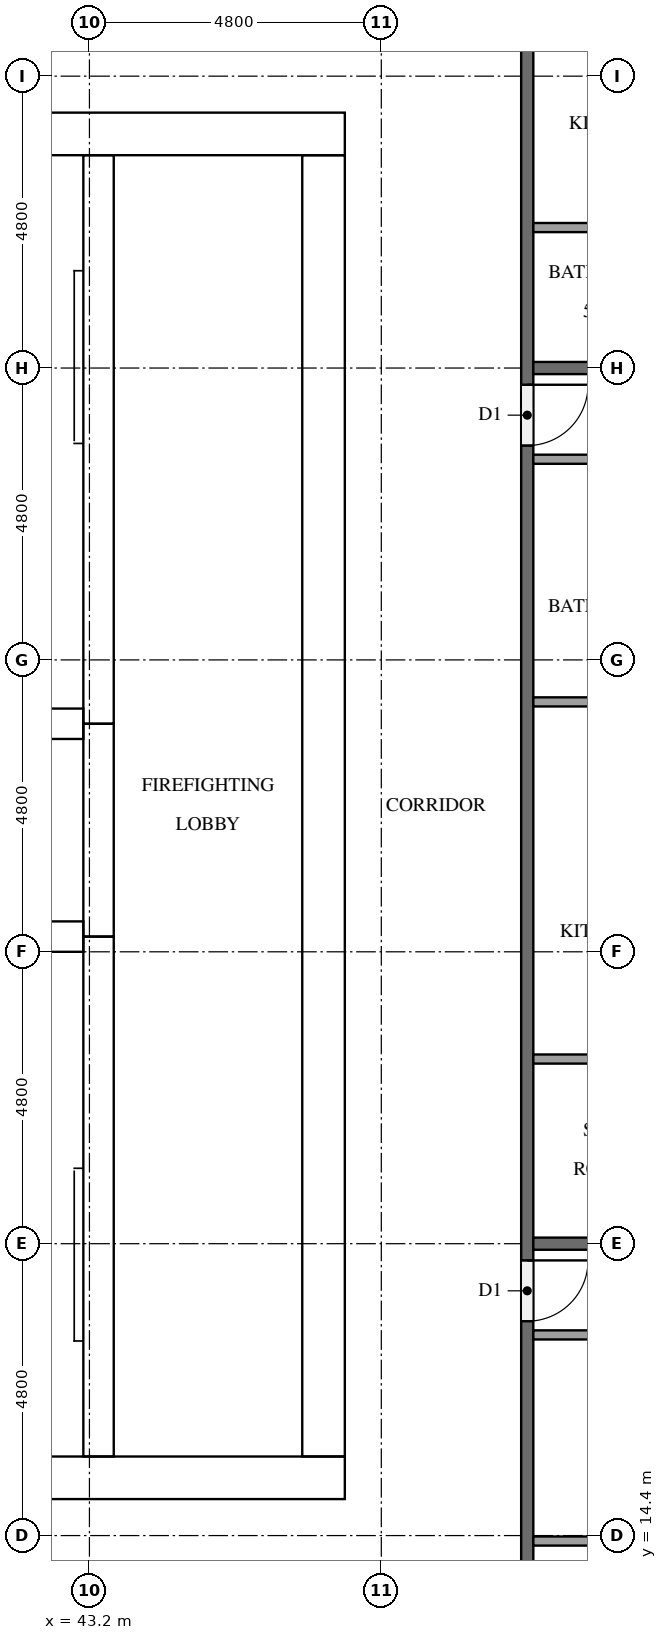
"""IFC4 building model, lengths in metres.
Left out: names, types, materials, properties, quantities, classifications, styles, units other than length and angle.
Written with IfcOpenShell. Run it as: python <this file> out.ifc"""

import sys

from ifc_helpers import new_model, si_unit, direction, frame, frame_2d, origin, place, context, subcontext, project, spatial, rectangle, extrude, element, fill, save


model = new_model("IFC4")
c1 = context("Model", 3, precision=1e-05, world=origin(), true_north=direction((0.0, 1.0)))
c2 = subcontext(c1, "Body", "Model", "MODEL_VIEW")
j1 = project(units=[si_unit("LENGTHUNIT", "METRE"), si_unit("PLANEANGLEUNIT", "RADIAN")], contexts=[c1])
p1 = place(None, origin())
s1 = spatial("IfcSite", under=j1, at=p1, CompositionType="ELEMENT")
p2 = place(p1, origin())
s2 = spatial("IfcBuilding", under=s1, at=p2, CompositionType="ELEMENT")
p3 = place(p2, frame((0.0, 0.0, 222.8)))
s3 = spatial("IfcBuildingStorey", under=s2, at=p3, CompositionType="ELEMENT", Elevation=222.8)
p4 = place(p3, frame((15.0, 15.35, 0.0), z_axis=(0.0, 0.0, 1.0), x_axis=(1.0, 0.0, 0.0)))
e1 = element("IfcWall", 1, at=p4, inside=s3, PredefinedType="SHEAR", context=c2, shape_type="SweptSolid", body=[
    extrude(rectangle(XDim=32.4, YDim=0.7, at=frame_2d((16.2, 0.0))), origin(), (0.0, 0.0, 1.0), 3.2),
])
p5 = place(p4, frame((15.3, 0.0, 0.0)))
e2 = element("IfcOpeningElement", 2, at=p5, cuts=e1, PredefinedType="OPENING", context=c2, shape_type="SweptSolid", body=[
    extrude(rectangle(XDim=1.8, YDim=2.1, at=frame_2d((0.9, 1.05))), frame((0.0, 0.36, 0.0), z_axis=(0.0, -1.0, 0.0), x_axis=(1.0, 0.0, 0.0)), (0.0, 0.0, 1.0), 0.72),
])
p6 = place(p3, frame((15.0, 37.45, 0.0), z_axis=(0.0, 0.0, 1.0), x_axis=(1.0, 0.0, 0.0)))
e3 = element("IfcWall", 3, at=p6, inside=s3, PredefinedType="SHEAR", context=c2, shape_type="SweptSolid", body=[
    extrude(rectangle(XDim=32.4, YDim=0.7, at=frame_2d((16.2, 0.0))), origin(), (0.0, 0.0, 1.0), 3.2),
])
p7 = place(p6, frame((15.3, 0.0, 0.0)))
e4 = element("IfcOpeningElement", 4, at=p7, cuts=e3, PredefinedType="OPENING", context=c2, shape_type="SweptSolid", body=[
    extrude(rectangle(XDim=1.8, YDim=2.1, at=frame_2d((0.9, 1.05))), frame((0.0, 0.36, 0.0), z_axis=(0.0, -1.0, 0.0), x_axis=(1.0, 0.0, 0.0)), (0.0, 0.0, 1.0), 0.72),
])
p8 = place(p6, frame((1.544, 0.0, 0.0)))
e5 = element("IfcOpeningElement", 5, at=p8, cuts=e3, PredefinedType="OPENING", context=c2, shape_type="SweptSolid", body=[
    extrude(rectangle(XDim=1.0, YDim=2.1, at=frame_2d((0.5, 1.05))), frame((0.0, 0.36, 0.0), z_axis=(0.0, -1.0, 0.0), x_axis=(1.0, 0.0, 0.0)), (0.0, 0.0, 1.0), 0.72),
])
p9 = place(p6, frame((5.219, 0.0, 0.0)))
e6 = element("IfcOpeningElement", 6, at=p9, cuts=e3, PredefinedType="OPENING", context=c2, shape_type="SweptSolid", body=[
    extrude(rectangle(XDim=1.0, YDim=2.1, at=frame_2d((0.5, 1.05))), frame((0.0, 0.36, 0.0), z_axis=(0.0, -1.0, 0.0), x_axis=(1.0, 0.0, 0.0)), (0.0, 0.0, 1.0), 0.72),
])
p10 = place(p3, frame((47.05, 15.7, 0.0), z_axis=(0.0, 0.0, 1.0), x_axis=(0.0, 1.0, 0.0)))
e7 = element("IfcWall", 7, at=p10, inside=s3, PredefinedType="SHEAR", context=c2, shape_type="SweptSolid", body=[
    extrude(rectangle(XDim=21.4, YDim=0.7, at=frame_2d((10.7, 0.0))), origin(), (0.0, 0.0, 1.0), 3.2),
])
p11 = place(p10, frame((10.4, 0.0, 0.0)))
e8 = element("IfcOpeningElement", 8, at=p11, cuts=e7, PredefinedType="OPENING", context=c2, shape_type="SweptSolid", body=[
    extrude(rectangle(XDim=1.2, YDim=2.1, at=frame_2d((0.6, 1.05))), frame((0.0, 0.36, 0.0), z_axis=(0.0, -1.0, 0.0), x_axis=(1.0, 0.0, 0.0)), (0.0, 0.0, 1.0), 0.72),
])
p12 = place(p3, frame((43.35, 15.7, 0.0), z_axis=(0.0, 0.0, 1.0), x_axis=(0.0, 1.0, 0.0)))
e9 = element("IfcWall", 9, at=p12, inside=s3, PredefinedType="SHEAR", context=c2, shape_type="SweptSolid", body=[
    extrude(rectangle(XDim=8.55, YDim=0.5, at=frame_2d((4.275, 0.0))), origin(), (0.0, 0.0, 1.0), 3.2),
])
p13 = place(p12, frame((0.5, 0.0, 0.0)))
e10 = element("IfcOpeningElement", 10, at=p13, cuts=e9, PredefinedType="OPENING", context=c2, shape_type="SweptSolid", body=[
    extrude(rectangle(XDim=1.2, YDim=2.1, at=frame_2d((0.6, 1.05))), frame((0.0, 0.26, 0.0), z_axis=(0.0, -1.0, 0.0), x_axis=(1.0, 0.0, 0.0)), (0.0, 0.0, 1.0), 0.52),
])
p14 = place(p3, frame((43.35, 24.25, 0.0), z_axis=(0.0, 0.0, 1.0), x_axis=(0.0, 1.0, 0.0)))
e11 = element("IfcWall", 11, at=p14, inside=s3, PredefinedType="SHEAR", context=c2, shape_type="SweptSolid", body=[
    extrude(rectangle(XDim=3.5, YDim=0.5, at=frame_2d((1.75, 0.0))), origin(), (0.0, 0.0, 1.0), 3.2),
])
p15 = place(p14, frame((1.2, 0.0, 0.0)))
e12 = element("IfcOpeningElement", 12, at=p15, cuts=e11, PredefinedType="OPENING", context=c2, shape_type="SweptSolid", body=[
    extrude(rectangle(XDim=1.1, YDim=2.1, at=frame_2d((0.55, 1.05))), frame((0.0, 0.26, 0.0), z_axis=(0.0, -1.0, 0.0), x_axis=(1.0, 0.0, 0.0)), (0.0, 0.0, 1.0), 0.52),
])
p16 = place(p3, frame((43.35, 27.75, 0.0), z_axis=(0.0, 0.0, 1.0), x_axis=(0.0, 1.0, 0.0)))
e13 = element("IfcWall", 13, at=p16, inside=s3, PredefinedType="SHEAR", context=c2, shape_type="SweptSolid", body=[
    extrude(rectangle(XDim=9.35, YDim=0.5, at=frame_2d((4.675, 0.0))), origin(), (0.0, 0.0, 1.0), 3.2),
])
p17 = place(p16, frame((7.65, 0.0, 0.0)))
e14 = element("IfcOpeningElement", 14, at=p17, cuts=e13, PredefinedType="OPENING", context=c2, shape_type="SweptSolid", body=[
    extrude(rectangle(XDim=1.2, YDim=2.1, at=frame_2d((0.6, 1.05))), frame((0.0, 0.26, 0.0), z_axis=(0.0, -1.0, 0.0), x_axis=(1.0, 0.0, 0.0)), (0.0, 0.0, 1.0), 0.52),
])
for number, where, z_axis, x_axis in (
    (15, (39.55, 24.25, 0.0), (0.0, 0.0, 1.0), (1.0, 0.0, 0.0)),
    (16, (39.55, 27.75, 0.0), (0.0, 0.0, 1.0), (1.0, 0.0, 0.0)),
):
    element("IfcWall", number, at=place(p3, frame(where, z_axis=z_axis, x_axis=x_axis)), inside=s3, PredefinedType="SHEAR", context=c2, shape_type="SweptSolid", body=[
        extrude(rectangle(XDim=3.55, YDim=0.5, at=frame_2d((1.775, 0.0))), origin(), (0.0, 0.0, 1.0), 3.2),
    ])
p18 = place(p3, frame((50.4, 40.7, 0.0), z_axis=(0.0, 0.0, 1.0), x_axis=(0.0, -1.0, 0.0)))
e17 = element("IfcWall", 17, at=p18, inside=s3, PredefinedType="PARTITIONING", context=c2, shape_type="SweptSolid", body=[
    extrude(rectangle(XDim=28.6, YDim=0.2, at=frame_2d((14.3, 0.0))), origin(), (0.0, 0.0, 1.0), 3.2),
])
p19 = place(p18, frame((21.775, 0.0, 0.0)))
e18 = element("IfcOpeningElement", 18, at=p19, cuts=e17, PredefinedType="OPENING", context=c2, shape_type="SweptSolid", body=[
    extrude(rectangle(XDim=1.0, YDim=2.1, at=frame_2d((0.5, 1.05))), frame((0.0, 0.11, 0.0), z_axis=(0.0, -1.0, 0.0), x_axis=(1.0, 0.0, 0.0)), (0.0, 0.0, 1.0), 0.22),
])
p20 = place(p18, frame((7.375, 0.0, 0.0)))
e19 = element("IfcOpeningElement", 19, at=p20, cuts=e17, PredefinedType="OPENING", context=c2, shape_type="SweptSolid", body=[
    extrude(rectangle(XDim=1.0, YDim=2.1, at=frame_2d((0.5, 1.05))), frame((0.0, 0.11, 0.0), z_axis=(0.0, -1.0, 0.0), x_axis=(1.0, 0.0, 0.0)), (0.0, 0.0, 1.0), 0.22),
])
p21 = place(p18, frame((0.175, 0.0, 0.0)))
e20 = element("IfcOpeningElement", 20, at=p21, cuts=e17, PredefinedType="OPENING", context=c2, shape_type="SweptSolid", body=[
    extrude(rectangle(XDim=1.0, YDim=2.1, at=frame_2d((0.5, 1.05))), frame((0.0, 0.11, 0.0), z_axis=(0.0, -1.0, 0.0), x_axis=(1.0, 0.0, 0.0)), (0.0, 0.0, 1.0), 0.22),
])
p22 = place(p3, frame((50.5, 19.2, 0.0), z_axis=(0.0, 0.0, 1.0), x_axis=(1.0, 0.0, 0.0)))
e21 = element("IfcWall", 21, at=p22, inside=s3, PredefinedType="PARTITIONING", context=c2, shape_type="SweptSolid", body=[
    extrude(rectangle(XDim=11.575, YDim=0.2, at=frame_2d((5.788, 0.0))), origin(), (0.0, 0.0, 1.0), 3.2),
])
p23 = place(p3, frame((50.5, 33.6, 0.0), z_axis=(0.0, 0.0, 1.0), x_axis=(1.0, 0.0, 0.0)))
e22 = element("IfcWall", 22, at=p23, inside=s3, PredefinedType="PARTITIONING", context=c2, shape_type="SweptSolid", body=[
    extrude(rectangle(XDim=11.8, YDim=0.2, at=frame_2d((5.9, 0.0))), origin(), (0.0, 0.0, 1.0), 3.2),
])
p24 = place(p3, frame((50.5, 14.31, 0.0), z_axis=(0.0, 0.0, 1.0), x_axis=(1.0, 0.0, 0.0)))
e23 = element("IfcWall", 23, at=p24, inside=s3, PredefinedType="PARTITIONING", context=c2, shape_type="SweptSolid", body=[
    extrude(rectangle(XDim=3.875, YDim=0.15, at=frame_2d((1.938, 0.0))), origin(), (0.0, 0.0, 1.0), 3.2),
])
p25 = place(p3, frame((50.5, 17.7, 0.0), z_axis=(0.0, 0.0, 1.0), x_axis=(1.0, 0.0, 0.0)))
e24 = element("IfcWall", 24, at=p25, inside=s3, PredefinedType="PARTITIONING", context=c2, shape_type="SweptSolid", body=[
    extrude(rectangle(XDim=4.025, YDim=0.15, at=frame_2d((2.012, 0.0))), origin(), (0.0, 0.0, 1.0), 3.2),
])
for number, where, z_axis, x_axis in (
    (25, (50.5, 28.11, 0.0), (0.0, 0.0, 1.0), (1.0, 0.0, 0.0)),
    (26, (50.5, 22.237, 0.0), (0.0, 0.0, 1.0), (1.0, 0.0, 0.0)),
):
    element("IfcWall", number, at=place(p3, frame(where, z_axis=z_axis, x_axis=x_axis)), inside=s3, PredefinedType="PARTITIONING", context=c2, shape_type="SweptSolid", body=[
        extrude(rectangle(XDim=2.975, YDim=0.15, at=frame_2d((1.488, 0.0))), origin(), (0.0, 0.0, 1.0), 3.2),
    ])
p26 = place(p3, frame((50.5, 32.1, 0.0), z_axis=(0.0, 0.0, 1.0), x_axis=(1.0, 0.0, 0.0)))
e27 = element("IfcWall", 27, at=p26, inside=s3, PredefinedType="PARTITIONING", context=c2, shape_type="SweptSolid", body=[
    extrude(rectangle(XDim=3.125, YDim=0.15, at=frame_2d((1.562, 0.0))), origin(), (0.0, 0.0, 1.0), 3.2),
])
p27 = place(p3, frame((50.5, 35.91, 0.0), z_axis=(0.0, 0.0, 1.0), x_axis=(1.0, 0.0, 0.0)))
e28 = element("IfcWall", 28, at=p27, inside=s3, PredefinedType="PARTITIONING", context=c2, shape_type="SweptSolid", body=[
    extrude(rectangle(XDim=3.275, YDim=0.15, at=frame_2d((1.637, 0.0))), origin(), (0.0, 0.0, 1.0), 3.2),
])
p28 = place(p15, origin())
e29 = element("IfcDoor", 29, at=p28, inside=s3, OperationType="DOUBLE_DOOR_SLIDING", PredefinedType="DOOR", context=c2, shape_type="SweptSolid", body=[
    extrude(rectangle(XDim=1.1, YDim=2.1, at=frame_2d((0.55, 1.05))), frame((0.0, 0.025, 0.0), z_axis=(0.0, -1.0, 0.0), x_axis=(1.0, 0.0, 0.0)), (0.0, 0.0, 1.0), 0.05),
])
fill(e12, e29)
p29 = place(p13, origin())
e30 = element("IfcDoor", 30, at=p29, inside=s3, OperationType="SINGLE_SWING_LEFT", PredefinedType="DOOR", context=c2, shape_type="SweptSolid", body=[
    extrude(rectangle(XDim=1.2, YDim=2.1, at=frame_2d((0.6, 1.05))), frame((0.0, 0.025, 0.0), z_axis=(0.0, -1.0, 0.0), x_axis=(1.0, 0.0, 0.0)), (0.0, 0.0, 1.0), 0.05),
])
fill(e10, e30)
p30 = place(p17, origin())
e31 = element("IfcDoor", 31, at=p30, inside=s3, OperationType="SINGLE_SWING_RIGHT", PredefinedType="DOOR", context=c2, shape_type="SweptSolid", body=[
    extrude(rectangle(XDim=1.2, YDim=2.1, at=frame_2d((0.6, 1.05))), frame((0.0, 0.025, 0.0), z_axis=(0.0, -1.0, 0.0), x_axis=(1.0, 0.0, 0.0)), (0.0, 0.0, 1.0), 0.05),
])
fill(e14, e31)
p31 = place(p11, origin())
e32 = element("IfcDoor", 32, at=p31, inside=s3, OperationType="SINGLE_SWING_RIGHT", PredefinedType="DOOR", context=c2, shape_type="SweptSolid", body=[
    extrude(rectangle(XDim=1.2, YDim=2.1, at=frame_2d((0.6, 1.05))), frame((0.0, 0.025, 0.0), z_axis=(0.0, -1.0, 0.0), x_axis=(1.0, 0.0, 0.0)), (0.0, 0.0, 1.0), 0.05),
])
fill(e8, e32)
p32 = place(p19, origin())
e33 = element("IfcDoor", 33, at=p32, inside=s3, OperationType="SINGLE_SWING_LEFT", PredefinedType="DOOR", context=c2, shape_type="SweptSolid", body=[
    extrude(rectangle(XDim=1.0, YDim=2.1, at=frame_2d((0.5, 1.05))), frame((0.0, 0.025, 0.0), z_axis=(0.0, -1.0, 0.0), x_axis=(1.0, 0.0, 0.0)), (0.0, 0.0, 1.0), 0.05),
])
fill(e18, e33)
p33 = place(p20, origin())
e34 = element("IfcDoor", 34, at=p33, inside=s3, OperationType="SINGLE_SWING_LEFT", PredefinedType="DOOR", context=c2, shape_type="SweptSolid", body=[
    extrude(rectangle(XDim=1.0, YDim=2.1, at=frame_2d((0.5, 1.05))), frame((0.0, 0.025, 0.0), z_axis=(0.0, -1.0, 0.0), x_axis=(1.0, 0.0, 0.0)), (0.0, 0.0, 1.0), 0.05),
])
fill(e19, e34)
save(model, sys.argv[1])
